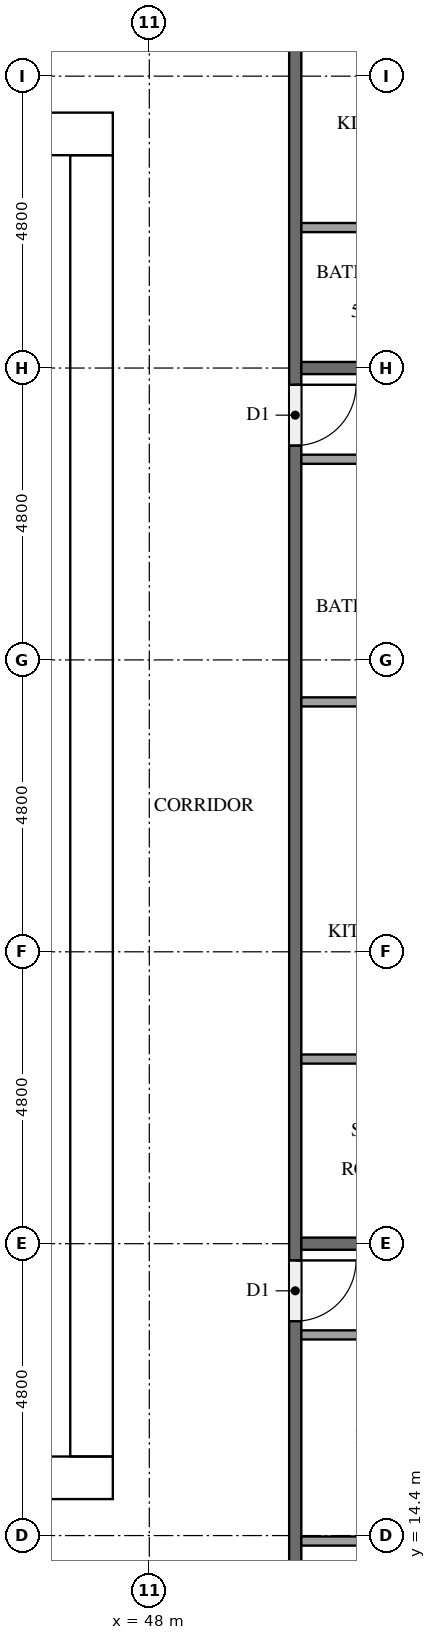
"""IFC4 building model, lengths in metres.
Left out: names, types, materials, properties, quantities, classifications, styles, units other than length and angle.
Written with IfcOpenShell. Run it as: python <this file> out.ifc"""

import sys

from ifc_helpers import new_model, si_unit, direction, frame, frame_2d, origin, place, context, subcontext, project, spatial, rectangle, extrude, element, fill, save


model = new_model("IFC4")
c1 = context("Model", 3, precision=1e-05, world=origin(), true_north=direction((0.0, 1.0)))
c2 = subcontext(c1, "Body", "Model", "MODEL_VIEW")
j1 = project(units=[si_unit("LENGTHUNIT", "METRE"), si_unit("PLANEANGLEUNIT", "RADIAN")], contexts=[c1])
p1 = place(None, origin())
s1 = spatial("IfcSite", under=j1, at=p1, CompositionType="ELEMENT")
p2 = place(p1, origin())
s2 = spatial("IfcBuilding", under=s1, at=p2, CompositionType="ELEMENT")
p3 = place(p2, frame((0.0, 0.0, 219.3)))
s3 = spatial("IfcBuildingStorey", under=s2, at=p3, CompositionType="ELEMENT", Elevation=219.3)
p4 = place(p3, frame((15.0, 15.35, 0.0), z_axis=(0.0, 0.0, 1.0), x_axis=(1.0, 0.0, 0.0)))
e1 = element("IfcWall", 1, at=p4, inside=s3, PredefinedType="SHEAR", context=c2, shape_type="SweptSolid", body=[
    extrude(rectangle(XDim=32.4, YDim=0.7, at=frame_2d((16.2, 0.0))), origin(), (0.0, 0.0, 1.0), 3.2),
])
p5 = place(p4, frame((15.3, 0.0, 0.0)))
e2 = element("IfcOpeningElement", 2, at=p5, cuts=e1, PredefinedType="OPENING", context=c2, shape_type="SweptSolid", body=[
    extrude(rectangle(XDim=1.8, YDim=2.1, at=frame_2d((0.9, 1.05))), frame((0.0, 0.36, 0.0), z_axis=(0.0, -1.0, 0.0), x_axis=(1.0, 0.0, 0.0)), (0.0, 0.0, 1.0), 0.72),
])
p6 = place(p3, frame((15.0, 37.45, 0.0), z_axis=(0.0, 0.0, 1.0), x_axis=(1.0, 0.0, 0.0)))
e3 = element("IfcWall", 3, at=p6, inside=s3, PredefinedType="SHEAR", context=c2, shape_type="SweptSolid", body=[
    extrude(rectangle(XDim=32.4, YDim=0.7, at=frame_2d((16.2, 0.0))), origin(), (0.0, 0.0, 1.0), 3.2),
])
p7 = place(p6, frame((15.3, 0.0, 0.0)))
e4 = element("IfcOpeningElement", 4, at=p7, cuts=e3, PredefinedType="OPENING", context=c2, shape_type="SweptSolid", body=[
    extrude(rectangle(XDim=1.8, YDim=2.1, at=frame_2d((0.9, 1.05))), frame((0.0, 0.36, 0.0), z_axis=(0.0, -1.0, 0.0), x_axis=(1.0, 0.0, 0.0)), (0.0, 0.0, 1.0), 0.72),
])
p8 = place(p6, frame((1.544, 0.0, 0.0)))
e5 = element("IfcOpeningElement", 5, at=p8, cuts=e3, PredefinedType="OPENING", context=c2, shape_type="SweptSolid", body=[
    extrude(rectangle(XDim=1.0, YDim=2.1, at=frame_2d((0.5, 1.05))), frame((0.0, 0.36, 0.0), z_axis=(0.0, -1.0, 0.0), x_axis=(1.0, 0.0, 0.0)), (0.0, 0.0, 1.0), 0.72),
])
p9 = place(p6, frame((5.219, 0.0, 0.0)))
e6 = element("IfcOpeningElement", 6, at=p9, cuts=e3, PredefinedType="OPENING", context=c2, shape_type="SweptSolid", body=[
    extrude(rectangle(XDim=1.0, YDim=2.1, at=frame_2d((0.5, 1.05))), frame((0.0, 0.36, 0.0), z_axis=(0.0, -1.0, 0.0), x_axis=(1.0, 0.0, 0.0)), (0.0, 0.0, 1.0), 0.72),
])
p10 = place(p3, frame((47.05, 15.7, 0.0), z_axis=(0.0, 0.0, 1.0), x_axis=(0.0, 1.0, 0.0)))
e7 = element("IfcWall", 7, at=p10, inside=s3, PredefinedType="SHEAR", context=c2, shape_type="SweptSolid", body=[
    extrude(rectangle(XDim=21.4, YDim=0.7, at=frame_2d((10.7, 0.0))), origin(), (0.0, 0.0, 1.0), 3.2),
])
p11 = place(p10, frame((10.4, 0.0, 0.0)))
e8 = element("IfcOpeningElement", 8, at=p11, cuts=e7, PredefinedType="OPENING", context=c2, shape_type="SweptSolid", body=[
    extrude(rectangle(XDim=1.2, YDim=2.1, at=frame_2d((0.6, 1.05))), frame((0.0, 0.36, 0.0), z_axis=(0.0, -1.0, 0.0), x_axis=(1.0, 0.0, 0.0)), (0.0, 0.0, 1.0), 0.72),
])
p12 = place(p3, frame((50.4, 40.7, 0.0), z_axis=(0.0, 0.0, 1.0), x_axis=(0.0, -1.0, 0.0)))
e9 = element("IfcWall", 9, at=p12, inside=s3, PredefinedType="PARTITIONING", context=c2, shape_type="SweptSolid", body=[
    extrude(rectangle(XDim=28.6, YDim=0.2, at=frame_2d((14.3, 0.0))), origin(), (0.0, 0.0, 1.0), 3.2),
])
p13 = place(p12, frame((21.775, 0.0, 0.0)))
e10 = element("IfcOpeningElement", 10, at=p13, cuts=e9, PredefinedType="OPENING", context=c2, shape_type="SweptSolid", body=[
    extrude(rectangle(XDim=1.0, YDim=2.1, at=frame_2d((0.5, 1.05))), frame((0.0, 0.11, 0.0), z_axis=(0.0, -1.0, 0.0), x_axis=(1.0, 0.0, 0.0)), (0.0, 0.0, 1.0), 0.22),
])
p14 = place(p12, frame((7.375, 0.0, 0.0)))
e11 = element("IfcOpeningElement", 11, at=p14, cuts=e9, PredefinedType="OPENING", context=c2, shape_type="SweptSolid", body=[
    extrude(rectangle(XDim=1.0, YDim=2.1, at=frame_2d((0.5, 1.05))), frame((0.0, 0.11, 0.0), z_axis=(0.0, -1.0, 0.0), x_axis=(1.0, 0.0, 0.0)), (0.0, 0.0, 1.0), 0.22),
])
p15 = place(p12, frame((0.175, 0.0, 0.0)))
e12 = element("IfcOpeningElement", 12, at=p15, cuts=e9, PredefinedType="OPENING", context=c2, shape_type="SweptSolid", body=[
    extrude(rectangle(XDim=1.0, YDim=2.1, at=frame_2d((0.5, 1.05))), frame((0.0, 0.11, 0.0), z_axis=(0.0, -1.0, 0.0), x_axis=(1.0, 0.0, 0.0)), (0.0, 0.0, 1.0), 0.22),
])
p16 = place(p3, frame((50.5, 19.2, 0.0), z_axis=(0.0, 0.0, 1.0), x_axis=(1.0, 0.0, 0.0)))
e13 = element("IfcWall", 13, at=p16, inside=s3, PredefinedType="PARTITIONING", context=c2, shape_type="SweptSolid", body=[
    extrude(rectangle(XDim=11.575, YDim=0.2, at=frame_2d((5.788, 0.0))), origin(), (0.0, 0.0, 1.0), 3.2),
])
p17 = place(p3, frame((50.5, 33.6, 0.0), z_axis=(0.0, 0.0, 1.0), x_axis=(1.0, 0.0, 0.0)))
e14 = element("IfcWall", 14, at=p17, inside=s3, PredefinedType="PARTITIONING", context=c2, shape_type="SweptSolid", body=[
    extrude(rectangle(XDim=11.8, YDim=0.2, at=frame_2d((5.9, 0.0))), origin(), (0.0, 0.0, 1.0), 3.2),
])
p18 = place(p3, frame((50.5, 14.31, 0.0), z_axis=(0.0, 0.0, 1.0), x_axis=(1.0, 0.0, 0.0)))
e15 = element("IfcWall", 15, at=p18, inside=s3, PredefinedType="PARTITIONING", context=c2, shape_type="SweptSolid", body=[
    extrude(rectangle(XDim=3.875, YDim=0.15, at=frame_2d((1.938, 0.0))), origin(), (0.0, 0.0, 1.0), 3.2),
])
p19 = place(p3, frame((50.5, 17.7, 0.0), z_axis=(0.0, 0.0, 1.0), x_axis=(1.0, 0.0, 0.0)))
e16 = element("IfcWall", 16, at=p19, inside=s3, PredefinedType="PARTITIONING", context=c2, shape_type="SweptSolid", body=[
    extrude(rectangle(XDim=4.025, YDim=0.15, at=frame_2d((2.012, 0.0))), origin(), (0.0, 0.0, 1.0), 3.2),
])
for number, where, z_axis, x_axis in (
    (17, (50.5, 28.11, 0.0), (0.0, 0.0, 1.0), (1.0, 0.0, 0.0)),
    (18, (50.5, 22.237, 0.0), (0.0, 0.0, 1.0), (1.0, 0.0, 0.0)),
):
    element("IfcWall", number, at=place(p3, frame(where, z_axis=z_axis, x_axis=x_axis)), inside=s3, PredefinedType="PARTITIONING", context=c2, shape_type="SweptSolid", body=[
        extrude(rectangle(XDim=2.975, YDim=0.15, at=frame_2d((1.488, 0.0))), origin(), (0.0, 0.0, 1.0), 3.2),
    ])
p20 = place(p3, frame((50.5, 32.1, 0.0), z_axis=(0.0, 0.0, 1.0), x_axis=(1.0, 0.0, 0.0)))
e19 = element("IfcWall", 19, at=p20, inside=s3, PredefinedType="PARTITIONING", context=c2, shape_type="SweptSolid", body=[
    extrude(rectangle(XDim=3.125, YDim=0.15, at=frame_2d((1.562, 0.0))), origin(), (0.0, 0.0, 1.0), 3.2),
])
p21 = place(p3, frame((50.5, 35.91, 0.0), z_axis=(0.0, 0.0, 1.0), x_axis=(1.0, 0.0, 0.0)))
e20 = element("IfcWall", 20, at=p21, inside=s3, PredefinedType="PARTITIONING", context=c2, shape_type="SweptSolid", body=[
    extrude(rectangle(XDim=3.275, YDim=0.15, at=frame_2d((1.637, 0.0))), origin(), (0.0, 0.0, 1.0), 3.2),
])
p22 = place(p11, origin())
e21 = element("IfcDoor", 21, at=p22, inside=s3, OperationType="SINGLE_SWING_LEFT", PredefinedType="DOOR", context=c2, shape_type="SweptSolid", body=[
    extrude(rectangle(XDim=1.2, YDim=2.1, at=frame_2d((0.6, 1.05))), frame((0.0, 0.025, 0.0), z_axis=(0.0, -1.0, 0.0), x_axis=(1.0, 0.0, 0.0)), (0.0, 0.0, 1.0), 0.05),
])
fill(e8, e21)
p23 = place(p13, origin())
e22 = element("IfcDoor", 22, at=p23, inside=s3, OperationType="SINGLE_SWING_LEFT", PredefinedType="DOOR", context=c2, shape_type="SweptSolid", body=[
    extrude(rectangle(XDim=1.0, YDim=2.1, at=frame_2d((0.5, 1.05))), frame((0.0, 0.025, 0.0), z_axis=(0.0, -1.0, 0.0), x_axis=(1.0, 0.0, 0.0)), (0.0, 0.0, 1.0), 0.05),
])
fill(e10, e22)
p24 = place(p14, origin())
e23 = element("IfcDoor", 23, at=p24, inside=s3, OperationType="SINGLE_SWING_LEFT", PredefinedType="DOOR", context=c2, shape_type="SweptSolid", body=[
    extrude(rectangle(XDim=1.0, YDim=2.1, at=frame_2d((0.5, 1.05))), frame((0.0, 0.025, 0.0), z_axis=(0.0, -1.0, 0.0), x_axis=(1.0, 0.0, 0.0)), (0.0, 0.0, 1.0), 0.05),
])
fill(e11, e23)
save(model, sys.argv[1])
